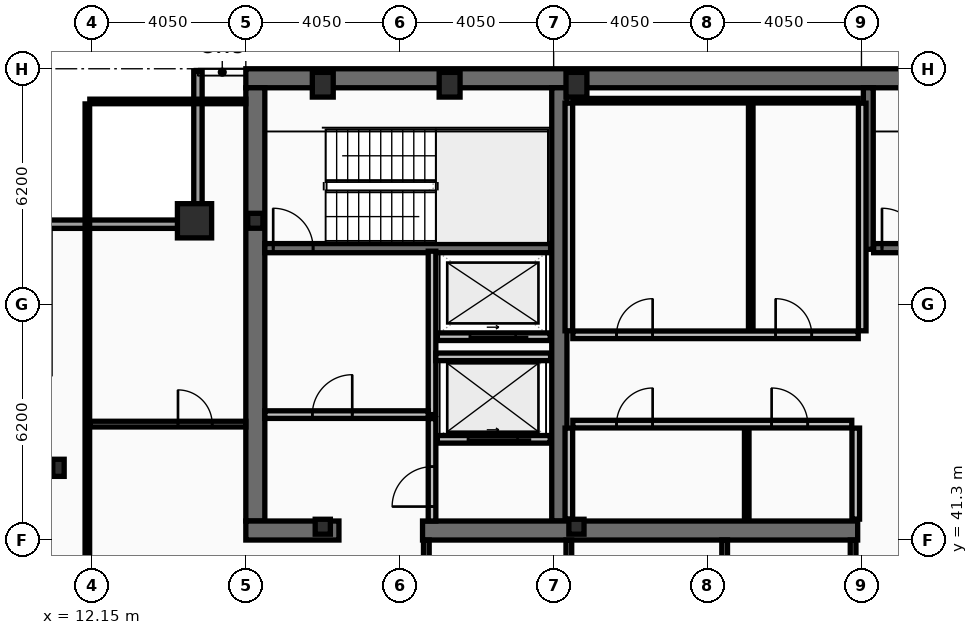
"""IFC4 building model, lengths in metres.
Left out: names, types, materials, properties, quantities, classifications, styles, units other than length and angle.
Written with IfcOpenShell. Run it as: python <this file> out.ifc"""

import sys

from ifc_helpers import new_model, si_unit, direction, frame, frame_2d, origin, origin_2d, place, context, subcontext, project, spatial, rectangle, hollow_rectangle, i_section, extrude, element, fill, save


model = new_model("IFC4")
c1 = context("Model", 3, precision=1e-05, world=origin(), true_north=direction((0.0, 1.0)))
c2 = subcontext(c1, "Body", "Model", "MODEL_VIEW")
j1 = project(units=[si_unit("LENGTHUNIT", "METRE"), si_unit("PLANEANGLEUNIT", "RADIAN")], contexts=[c1])
p1 = place(None, origin())
s1 = spatial("IfcSite", under=j1, at=p1, CompositionType="ELEMENT")
p2 = place(p1, origin())
s2 = spatial("IfcBuilding", under=s1, at=p2, CompositionType="ELEMENT")
p3 = place(p2, frame((0.0, 0.0, 295.0)))
s3 = spatial("IfcBuildingStorey", under=s2, at=p3, CompositionType="ELEMENT", Elevation=295.0)
p4 = place(p3, frame((16.2, 53.45, 0.0), z_axis=(0.0, 0.0, 1.0), x_axis=(1.0, 0.0, 0.0)))
e1 = element("IfcWall", 1, at=p4, inside=s3, PredefinedType="SHEAR", context=c2, shape_type="SweptSolid", body=[
    extrude(rectangle(XDim=40.5, YDim=0.5, at=frame_2d((20.25, 0.0))), origin(), (0.0, 0.0, 1.0), 3.44),
])
p5 = place(p3, frame((16.45, 41.8, 0.0), z_axis=(0.0, 0.0, 1.0), x_axis=(0.0, 1.0, 0.0)))
e2 = element("IfcWall", 2, at=p5, inside=s3, PredefinedType="SHEAR", context=c2, shape_type="SweptSolid", body=[
    extrude(rectangle(XDim=11.4, YDim=0.5, at=frame_2d((5.7, 0.0))), origin(), (0.0, 0.0, 1.0), 3.44),
])
p6 = place(p3, frame((24.45, 41.8, 0.0), z_axis=(0.0, 0.0, 1.0), x_axis=(0.0, 1.0, 0.0)))
e3 = element("IfcWall", 3, at=p6, inside=s3, PredefinedType="SHEAR", context=c2, shape_type="SweptSolid", body=[
    extrude(rectangle(XDim=11.4, YDim=0.4, at=frame_2d((5.7, 0.0))), origin(), (0.0, 0.0, 1.0), 3.44),
])
p7 = place(p3, frame((18.65, 41.55, 0.0), z_axis=(0.0, 0.0, 1.0), x_axis=(-1.0, 0.0, 0.0)))
e4 = element("IfcWall", 4, at=p7, inside=s3, PredefinedType="SHEAR", context=c2, shape_type="SweptSolid", body=[
    extrude(rectangle(XDim=2.45, YDim=0.5, at=frame_2d((1.225, 0.0))), origin(), (0.0, 0.0, 1.0), 3.44),
])
p8 = place(p3, frame((32.3, 41.55, 0.0), z_axis=(0.0, 0.0, 1.0), x_axis=(-1.0, 0.0, 0.0)))
e5 = element("IfcWall", 5, at=p8, inside=s3, PredefinedType="SHEAR", context=c2, shape_type="SweptSolid", body=[
    extrude(rectangle(XDim=11.45, YDim=0.5, at=frame_2d((5.725, 0.0))), origin(), (0.0, 0.0, 1.0), 3.44),
])
p9 = place(p3, frame((32.58, 48.95, 0.0), z_axis=(0.0, 0.0, 1.0), x_axis=(0.0, 1.0, 0.0)))
e6 = element("IfcWall", 6, at=p9, inside=s3, PredefinedType="SHEAR", context=c2, shape_type="SweptSolid", body=[
    extrude(rectangle(XDim=4.25, YDim=0.26, at=frame_2d((2.125, 0.0))), origin(), (0.0, 0.0, 1.0), 3.44),
])
p10 = place(p3, frame((16.7, 48.98, 0.0), z_axis=(0.0, 0.0, 1.0), x_axis=(1.0, 0.0, 0.0)))
e7 = element("IfcWall", 7, at=p10, inside=s3, PredefinedType="SHEAR", context=c2, shape_type="SweptSolid", body=[
    extrude(rectangle(XDim=7.52, YDim=0.24, at=frame_2d((3.76, 0.0))), origin(), (0.0, 0.0, 1.0), 3.44),
])
p11 = place(p10, frame((0.22, 0.0, 0.0)))
e8 = element("IfcOpeningElement", 8, at=p11, cuts=e7, PredefinedType="OPENING", context=c2, shape_type="SweptSolid", body=[
    extrude(rectangle(XDim=1.05, YDim=2.15, at=frame_2d((0.525, 1.075))), frame((0.0, 0.13, 0.0), z_axis=(0.0, -1.0, 0.0), x_axis=(1.0, 0.0, 0.0)), (0.0, 0.0, 1.0), 0.26),
])
p12 = place(p3, frame((32.72, 48.98, 0.0), z_axis=(0.0, 0.0, 1.0), x_axis=(1.0, 0.0, 0.0)))
e9 = element("IfcWall", 9, at=p12, inside=s3, PredefinedType="SHEAR", context=c2, shape_type="SweptSolid", body=[
    extrude(rectangle(XDim=7.56, YDim=0.24, at=frame_2d((3.78, 0.0))), origin(), (0.0, 0.0, 1.0), 3.44),
])
p13 = place(p12, frame((0.22, 0.0, 0.0)))
e10 = element("IfcOpeningElement", 10, at=p13, cuts=e9, PredefinedType="OPENING", context=c2, shape_type="SweptSolid", body=[
    extrude(rectangle(XDim=1.05, YDim=2.15, at=frame_2d((0.525, 1.075))), frame((0.0, 0.13, 0.0), z_axis=(0.0, -1.0, 0.0), x_axis=(1.0, 0.0, 0.0)), (0.0, 0.0, 1.0), 0.26),
])
p14 = place(p3, frame((14.85, 49.7, 0.0), z_axis=(0.0, 0.0, 1.0), x_axis=(1.0, 0.0, 0.0)))
e11 = element("IfcColumn", 11, at=p14, inside=s3, PredefinedType="COLUMN", context=c2, shape_type="SweptSolid", body=[
    extrude(hollow_rectangle(XDim=0.9, YDim=0.9, WallThickness=0.05, at=origin_2d()), origin(), (0.0, 0.0, 1.0), 3.6),
])
for number, where, z_axis, x_axis in (
    (12, (18.225, 53.28, 0.0), (0.0, 0.0, 1.0), (1.0, 0.0, 0.0)),
    (13, (21.562, 53.28, 0.0), (0.0, 0.0, 1.0), (1.0, 0.0, 0.0)),
    (14, (24.9, 53.28, 0.0), (0.0, 0.0, 1.0), (1.0, 0.0, 0.0)),
):
    element("IfcColumn", number, at=place(p3, frame(where, z_axis=z_axis, x_axis=x_axis)), inside=s3, PredefinedType="COLUMN", context=c2, shape_type="SweptSolid", body=[
        extrude(hollow_rectangle(XDim=0.55, YDim=0.65, WallThickness=0.04, at=origin_2d()), origin(), (0.0, 0.0, 1.0), 3.6),
    ])
p15 = place(p3, frame((11.27, 43.2, 0.0), z_axis=(0.0, 0.0, 1.0), x_axis=(1.0, 0.0, 0.0)))
e15 = element("IfcColumn", 15, at=p15, inside=s3, PredefinedType="COLUMN", context=c2, shape_type="SweptSolid", body=[
    extrude(i_section(OverallWidth=0.3, OverallDepth=0.45, WebThickness=0.014, FlangeThickness=0.026, at=origin_2d()), origin(), (0.0, 0.0, 1.0), 3.6),
])
for number, where, z_axis, x_axis in (
    (16, (16.45, 49.7, 0.0), (0.0, 0.0, 1.0), (1.0, 0.0, 0.0)),
    (17, (18.225, 41.65, 0.0), (0.0, 0.0, 1.0), (1.0, 0.0, 0.0)),
    (18, (24.9, 41.65, 0.0), (0.0, 0.0, 1.0), (1.0, 0.0, 0.0)),
):
    element("IfcColumn", number, at=place(p3, frame(where, z_axis=z_axis, x_axis=x_axis)), inside=s3, PredefinedType="COLUMN", context=c2, shape_type="SweptSolid", body=[
        extrude(i_section(OverallWidth=0.399, OverallDepth=0.393, WebThickness=0.023, FlangeThickness=0.037, at=origin_2d()), origin(), (0.0, 0.0, 1.0), 3.6),
    ])
p16 = place(p3, frame((10.83, 49.61, 0.0), z_axis=(0.0, 0.0, 1.0), x_axis=(1.0, 0.0, 0.0)))
e19 = element("IfcWall", 19, at=p16, inside=s3, PredefinedType="SOLIDWALL", context=c2, shape_type="SweptSolid", body=[
    extrude(rectangle(XDim=4.22, YDim=0.22, at=frame_2d((2.11, 0.0))), origin(), (0.0, 0.0, 1.0), 2.88),
])
p17 = place(p3, frame((14.94, 49.72, 0.0), z_axis=(0.0, 0.0, 1.0), x_axis=(0.0, 1.0, 0.0)))
e20 = element("IfcWall", 20, at=p17, inside=s3, PredefinedType="SOLIDWALL", context=c2, shape_type="SweptSolid", body=[
    extrude(rectangle(XDim=3.91, YDim=0.22, at=frame_2d((1.955, 0.0))), origin(), (0.0, 0.0, 1.0), 2.88),
])
p18 = place(p3, frame((24.21, 43.95, 0.0), z_axis=(0.0, 0.0, 1.0), x_axis=(-1.0, 0.0, 0.0)))
e21 = element("IfcWall", 21, at=p18, inside=s3, PredefinedType="PARTITIONING", context=c2, shape_type="SweptSolid", body=[
    extrude(rectangle(XDim=2.97, YDim=0.2, at=frame_2d((1.485, 0.0))), origin(), (0.0, 0.0, 1.0), 3.44),
])
p19 = place(p18, frame((0.86, 0.0, 0.0)))
e22 = element("IfcOpeningElement", 22, at=p19, cuts=e21, PredefinedType="OPENING", context=c2, shape_type="SweptSolid", body=[
    extrude(rectangle(XDim=1.3, YDim=2.18, at=frame_2d((0.65, 1.09))), frame((0.0, 0.11, 0.0), z_axis=(0.0, -1.0, 0.0), x_axis=(1.0, 0.0, 0.0)), (0.0, 0.0, 1.0), 0.22),
])
p20 = place(p3, frame((24.21, 46.65, 0.0), z_axis=(0.0, 0.0, 1.0), x_axis=(-1.0, 0.0, 0.0)))
e23 = element("IfcWall", 23, at=p20, inside=s3, PredefinedType="PARTITIONING", context=c2, shape_type="SweptSolid", body=[
    extrude(rectangle(XDim=2.97, YDim=0.2, at=frame_2d((1.485, 0.0))), origin(), (0.0, 0.0, 1.0), 3.44),
])
p21 = place(p20, frame((0.91, 0.0, 0.0)))
e24 = element("IfcOpeningElement", 24, at=p21, cuts=e23, PredefinedType="OPENING", context=c2, shape_type="SweptSolid", body=[
    extrude(rectangle(XDim=1.2, YDim=2.18, at=frame_2d((0.6, 1.09))), frame((0.0, 0.11, 0.0), z_axis=(0.0, -1.0, 0.0), x_axis=(1.0, 0.0, 0.0)), (0.0, 0.0, 1.0), 0.22),
])
p22 = place(p3, frame((21.1, 44.6, 0.0), z_axis=(0.0, 0.0, 1.0), x_axis=(0.0, 1.0, 0.0)))
e25 = element("IfcWall", 25, at=p22, inside=s3, PredefinedType="PARTITIONING", context=c2, shape_type="SweptSolid", body=[
    extrude(rectangle(XDim=4.3, YDim=0.2, at=frame_2d((2.15, 0.0))), origin(), (0.0, 0.0, 1.0), 3.44),
])
p23 = place(p3, frame((16.7, 44.6, 0.0), z_axis=(0.0, 0.0, 1.0), x_axis=(1.0, 0.0, 0.0)))
e26 = element("IfcWall", 26, at=p23, inside=s3, PredefinedType="PARTITIONING", context=c2, shape_type="SweptSolid", body=[
    extrude(rectangle(XDim=4.3, YDim=0.2, at=frame_2d((2.15, 0.0))), origin(), (0.0, 0.0, 1.0), 3.44),
])
p24 = place(p23, frame((1.25, 0.0, 0.0)))
e27 = element("IfcOpeningElement", 27, at=p24, cuts=e26, PredefinedType="OPENING", context=c2, shape_type="SweptSolid", body=[
    extrude(rectangle(XDim=1.05, YDim=2.15, at=frame_2d((0.525, 1.075))), frame((0.0, 0.11, 0.0), z_axis=(0.0, -1.0, 0.0), x_axis=(1.0, 0.0, 0.0)), (0.0, 0.0, 1.0), 0.22),
])
p25 = place(p3, frame((21.2, 46.12, 0.0), z_axis=(0.0, 0.0, 1.0), x_axis=(1.0, 0.0, 0.0)))
e28 = element("IfcWall", 28, at=p25, inside=s3, PredefinedType="PARTITIONING", context=c2, shape_type="SweptSolid", body=[
    extrude(rectangle(XDim=3.02, YDim=0.2, at=frame_2d((1.51, 0.0))), origin(), (0.0, 0.0, 1.0), 3.44),
])
p26 = place(p3, frame((21.1, 41.8, 0.0), z_axis=(0.0, 0.0, 1.0), x_axis=(0.0, 1.0, 0.0)))
e29 = element("IfcWall", 29, at=p26, inside=s3, PredefinedType="PARTITIONING", context=c2, shape_type="SweptSolid", body=[
    extrude(rectangle(XDim=2.695, YDim=0.2, at=frame_2d((1.348, 0.0))), origin(), (0.0, 0.0, 1.0), 3.44),
])
p27 = place(p26, frame((0.38, 0.0, 0.0)))
e30 = element("IfcOpeningElement", 30, at=p27, cuts=e29, PredefinedType="OPENING", context=c2, shape_type="SweptSolid", body=[
    extrude(rectangle(XDim=1.05, YDim=2.15, at=frame_2d((0.525, 1.075))), frame((0.0, 0.11, 0.0), z_axis=(0.0, -1.0, 0.0), x_axis=(1.0, 0.0, 0.0)), (0.0, 0.0, 1.0), 0.22),
])
for number, where, z_axis, x_axis in (
    (31, (24.7, 46.805, 0.0), (0.0, 0.0, 1.0), (0.0, 1.0, 0.0)),
    (32, (32.42, 46.805, 0.0), (0.0, 0.0, 1.0), (0.0, 1.0, 0.0)),
):
    element("IfcWall", number, at=place(p3, frame(where, z_axis=z_axis, x_axis=x_axis)), inside=s3, PredefinedType="PARTITIONING", context=c2, shape_type="SweptSolid", body=[
        extrude(rectangle(XDim=5.99, YDim=0.2, at=frame_2d((2.995, 0.0))), origin(), (0.0, 0.0, 1.0), 3.44),
    ])
p28 = place(p3, frame((24.805, 52.86, 0.0), z_axis=(0.0, 0.0, 1.0), x_axis=(1.0, 0.0, 0.0)))
e33 = element("IfcWall", 33, at=p28, inside=s3, PredefinedType="PARTITIONING", context=c2, shape_type="SweptSolid", body=[
    extrude(rectangle(XDim=7.51, YDim=0.12, at=frame_2d((3.755, 0.0))), origin(), (0.0, 0.0, 1.0), 3.44),
])
p29 = place(p3, frame((29.486, 46.805, 0.0), z_axis=(0.0, 0.0, 1.0), x_axis=(0.0, 1.0, 0.0)))
e34 = element("IfcWall", 34, at=p29, inside=s3, PredefinedType="PARTITIONING", context=c2, shape_type="SweptSolid", body=[
    extrude(rectangle(XDim=5.99, YDim=0.12, at=frame_2d((2.995, 0.0))), origin(), (0.0, 0.0, 1.0), 3.44),
])
p30 = place(p3, frame((24.805, 46.7, 0.0), z_axis=(0.0, 0.0, 1.0), x_axis=(1.0, 0.0, 0.0)))
e35 = element("IfcWall", 35, at=p30, inside=s3, PredefinedType="PARTITIONING", context=c2, shape_type="SweptSolid", body=[
    extrude(rectangle(XDim=7.51, YDim=0.2, at=frame_2d((3.755, 0.0))), origin(), (0.0, 0.0, 1.0), 3.44),
])
p31 = place(p30, frame((1.15, 0.0, 0.0)))
e36 = element("IfcOpeningElement", 36, at=p31, cuts=e35, PredefinedType="OPENING", context=c2, shape_type="SweptSolid", body=[
    extrude(rectangle(XDim=0.95, YDim=2.1, at=frame_2d((0.475, 1.05))), frame((0.0, 0.11, 0.0), z_axis=(0.0, -1.0, 0.0), x_axis=(1.0, 0.0, 0.0)), (0.0, 0.0, 1.0), 0.22),
])
p32 = place(p30, frame((5.336, 0.0, 0.0)))
e37 = element("IfcOpeningElement", 37, at=p32, cuts=e35, PredefinedType="OPENING", context=c2, shape_type="SweptSolid", body=[
    extrude(rectangle(XDim=0.95, YDim=2.1, at=frame_2d((0.475, 1.05))), frame((0.0, 0.11, 0.0), z_axis=(0.0, -1.0, 0.0), x_axis=(1.0, 0.0, 0.0)), (0.0, 0.0, 1.0), 0.22),
])
for number, where, z_axis, x_axis in (
    (38, (24.7, 41.85, 0.0), (0.0, 0.0, 1.0), (0.0, 1.0, 0.0)),
    (39, (32.25, 41.85, 0.0), (0.0, 0.0, 1.0), (0.0, 1.0, 0.0)),
):
    element("IfcWall", number, at=place(p3, frame(where, z_axis=z_axis, x_axis=x_axis)), inside=s3, PredefinedType="PARTITIONING", context=c2, shape_type="SweptSolid", body=[
        extrude(rectangle(XDim=2.395, YDim=0.2, at=frame_2d((1.198, 0.0))), origin(), (0.0, 0.0, 1.0), 3.44),
    ])
p33 = place(p3, frame((29.381, 41.85, 0.0), z_axis=(0.0, 0.0, 1.0), x_axis=(0.0, 1.0, 0.0)))
e40 = element("IfcWall", 40, at=p33, inside=s3, PredefinedType="PARTITIONING", context=c2, shape_type="SweptSolid", body=[
    extrude(rectangle(XDim=2.395, YDim=0.12, at=frame_2d((1.198, 0.0))), origin(), (0.0, 0.0, 1.0), 3.44),
])
p34 = place(p3, frame((24.805, 44.35, 0.0), z_axis=(0.0, 0.0, 1.0), x_axis=(1.0, 0.0, 0.0)))
e41 = element("IfcWall", 41, at=p34, inside=s3, PredefinedType="PARTITIONING", context=c2, shape_type="SweptSolid", body=[
    extrude(rectangle(XDim=7.34, YDim=0.2, at=frame_2d((3.67, 0.0))), origin(), (0.0, 0.0, 1.0), 3.44),
])
p35 = place(p34, frame((1.15, 0.0, 0.0)))
e42 = element("IfcOpeningElement", 42, at=p35, cuts=e41, PredefinedType="OPENING", context=c2, shape_type="SweptSolid", body=[
    extrude(rectangle(XDim=0.95, YDim=2.1, at=frame_2d((0.475, 1.05))), frame((0.0, 0.11, 0.0), z_axis=(0.0, -1.0, 0.0), x_axis=(1.0, 0.0, 0.0)), (0.0, 0.0, 1.0), 0.22),
])
p36 = place(p34, frame((5.231, 0.0, 0.0)))
e43 = element("IfcOpeningElement", 43, at=p36, cuts=e41, PredefinedType="OPENING", context=c2, shape_type="SweptSolid", body=[
    extrude(rectangle(XDim=0.95, YDim=2.1, at=frame_2d((0.475, 1.05))), frame((0.0, 0.11, 0.0), z_axis=(0.0, -1.0, 0.0), x_axis=(1.0, 0.0, 0.0)), (0.0, 0.0, 1.0), 0.22),
])
p37 = place(p3, frame((20.95, 38.28, 0.0), z_axis=(0.0, 0.0, 1.0), x_axis=(0.0, 1.0, 0.0)))
e44 = element("IfcWall", 44, at=p37, inside=s3, PredefinedType="PARTITIONING", context=c2, shape_type="SweptSolid", body=[
    extrude(rectangle(XDim=3.02, YDim=0.15, at=frame_2d((1.51, 0.0))), origin(), (0.0, 0.0, 1.0), 3.44),
])
p38 = place(p3, frame((24.7, 38.28, 0.0), z_axis=(0.0, 0.0, 1.0), x_axis=(0.0, 1.0, 0.0)))
e45 = element("IfcWall", 45, at=p38, inside=s3, PredefinedType="PARTITIONING", context=c2, shape_type="SweptSolid", body=[
    extrude(rectangle(XDim=3.02, YDim=0.15, at=frame_2d((1.51, 0.0))), origin(), (0.0, 0.0, 1.0), 2.78),
])
for number, where, z_axis, x_axis in (
    (46, (28.8, 38.28, 0.0), (0.0, 0.0, 1.0), (0.0, 1.0, 0.0)),
    (47, (32.18, 38.28, 0.0), (0.0, 0.0, 1.0), (0.0, 1.0, 0.0)),
):
    element("IfcWall", number, at=place(p3, frame(where, z_axis=z_axis, x_axis=x_axis)), inside=s3, PredefinedType="PARTITIONING", context=c2, shape_type="SweptSolid", body=[
        extrude(rectangle(XDim=3.02, YDim=0.15, at=frame_2d((1.51, 0.0))), origin(), (0.0, 0.0, 1.0), 3.44),
    ])
p39 = place(p3, frame((12.095, 44.35, 0.0), z_axis=(0.0, 0.0, 1.0), x_axis=(1.0, 0.0, 0.0)))
e48 = element("IfcWall", 48, at=p39, inside=s3, PredefinedType="PARTITIONING", context=c2, shape_type="SweptSolid", body=[
    extrude(rectangle(XDim=4.105, YDim=0.15, at=frame_2d((2.052, 0.0))), origin(), (0.0, 0.0, 1.0), 2.88),
])
p40 = place(p39, frame((2.32, 0.0, 0.0)))
e49 = element("IfcOpeningElement", 49, at=p40, cuts=e48, PredefinedType="OPENING", context=c2, shape_type="SweptSolid", body=[
    extrude(rectangle(XDim=0.9, YDim=2.05, at=frame_2d((0.45, 1.025))), frame((0.0, 0.085, 0.0), z_axis=(0.0, -1.0, 0.0), x_axis=(1.0, 0.0, 0.0)), (0.0, 0.0, 1.0), 0.17),
])
p41 = place(p3, frame((12.03, 10.665, 0.0), z_axis=(0.0, 0.0, 1.0), x_axis=(0.0, 1.0, 0.0)))
e50 = element("IfcWall", 50, at=p41, inside=s3, PredefinedType="PARTITIONING", context=c2, shape_type="SweptSolid", body=[
    extrude(rectangle(XDim=42.11, YDim=0.12, at=frame_2d((21.055, 0.0))), origin(), (0.0, 0.0, 1.0), 2.78),
])
p42 = place(p3, frame((12.095, 52.84, 0.0), z_axis=(0.0, 0.0, 1.0), x_axis=(1.0, 0.0, 0.0)))
e51 = element("IfcWall", 51, at=p42, inside=s3, PredefinedType="PARTITIONING", context=c2, shape_type="SweptSolid", body=[
    extrude(rectangle(XDim=4.105, YDim=0.12, at=frame_2d((2.052, 0.0))), origin(), (0.0, 0.0, 1.0), 3.44),
])
p43 = place(p11, origin())
e52 = element("IfcDoor", 52, at=p43, inside=s3, OperationType="SINGLE_SWING_LEFT", PredefinedType="DOOR", context=c2, shape_type="SweptSolid", body=[
    extrude(rectangle(XDim=1.05, YDim=2.15, at=frame_2d((0.525, 1.075))), frame((0.0, 0.025, 0.0), z_axis=(0.0, -1.0, 0.0), x_axis=(1.0, 0.0, 0.0)), (0.0, 0.0, 1.0), 0.05),
])
fill(e8, e52)
p44 = place(p13, origin())
e53 = element("IfcDoor", 53, at=p44, inside=s3, OperationType="SINGLE_SWING_LEFT", PredefinedType="DOOR", context=c2, shape_type="SweptSolid", body=[
    extrude(rectangle(XDim=1.05, YDim=2.15, at=frame_2d((0.525, 1.075))), frame((0.0, 0.025, 0.0), z_axis=(0.0, -1.0, 0.0), x_axis=(1.0, 0.0, 0.0)), (0.0, 0.0, 1.0), 0.05),
])
fill(e10, e53)
p45 = place(p19, origin())
e54 = element("IfcDoor", 54, at=p45, inside=s3, OperationType="SLIDING_TO_LEFT", PredefinedType="DOOR", context=c2, shape_type="SweptSolid", body=[
    extrude(rectangle(XDim=1.3, YDim=2.18, at=frame_2d((0.65, 1.09))), frame((0.0, 0.025, 0.0), z_axis=(0.0, -1.0, 0.0), x_axis=(1.0, 0.0, 0.0)), (0.0, 0.0, 1.0), 0.05),
])
fill(e22, e54)
p46 = place(p21, origin())
e55 = element("IfcDoor", 55, at=p46, inside=s3, OperationType="SLIDING_TO_LEFT", PredefinedType="DOOR", context=c2, shape_type="SweptSolid", body=[
    extrude(rectangle(XDim=1.2, YDim=2.18, at=frame_2d((0.6, 1.09))), frame((0.0, 0.025, 0.0), z_axis=(0.0, -1.0, 0.0), x_axis=(1.0, 0.0, 0.0)), (0.0, 0.0, 1.0), 0.05),
])
fill(e24, e55)
p47 = place(p24, origin())
e56 = element("IfcDoor", 56, at=p47, inside=s3, OperationType="SINGLE_SWING_RIGHT", PredefinedType="DOOR", context=c2, shape_type="SweptSolid", body=[
    extrude(rectangle(XDim=1.05, YDim=2.15, at=frame_2d((0.525, 1.075))), frame((0.0, 0.025, 0.0), z_axis=(0.0, -1.0, 0.0), x_axis=(1.0, 0.0, 0.0)), (0.0, 0.0, 1.0), 0.05),
])
fill(e27, e56)
p48 = place(p27, origin())
e57 = element("IfcDoor", 57, at=p48, inside=s3, OperationType="SINGLE_SWING_LEFT", PredefinedType="DOOR", context=c2, shape_type="SweptSolid", body=[
    extrude(rectangle(XDim=1.05, YDim=2.15, at=frame_2d((0.525, 1.075))), frame((0.0, 0.025, 0.0), z_axis=(0.0, -1.0, 0.0), x_axis=(1.0, 0.0, 0.0)), (0.0, 0.0, 1.0), 0.05),
])
fill(e30, e57)
p49 = place(p31, origin())
e58 = element("IfcDoor", 58, at=p49, inside=s3, OperationType="SINGLE_SWING_RIGHT", PredefinedType="DOOR", context=c2, shape_type="SweptSolid", body=[
    extrude(rectangle(XDim=0.95, YDim=2.1, at=frame_2d((0.475, 1.05))), frame((0.0, 0.025, 0.0), z_axis=(0.0, -1.0, 0.0), x_axis=(1.0, 0.0, 0.0)), (0.0, 0.0, 1.0), 0.05),
])
fill(e36, e58)
p50 = place(p32, origin())
e59 = element("IfcDoor", 59, at=p50, inside=s3, OperationType="SINGLE_SWING_LEFT", PredefinedType="DOOR", context=c2, shape_type="SweptSolid", body=[
    extrude(rectangle(XDim=0.95, YDim=2.1, at=frame_2d((0.475, 1.05))), frame((0.0, 0.025, 0.0), z_axis=(0.0, -1.0, 0.0), x_axis=(1.0, 0.0, 0.0)), (0.0, 0.0, 1.0), 0.05),
])
fill(e37, e59)
p51 = place(p35, origin())
e60 = element("IfcDoor", 60, at=p51, inside=s3, OperationType="SINGLE_SWING_RIGHT", PredefinedType="DOOR", context=c2, shape_type="SweptSolid", body=[
    extrude(rectangle(XDim=0.95, YDim=2.1, at=frame_2d((0.475, 1.05))), frame((0.0, 0.025, 0.0), z_axis=(0.0, -1.0, 0.0), x_axis=(1.0, 0.0, 0.0)), (0.0, 0.0, 1.0), 0.05),
])
fill(e42, e60)
p52 = place(p36, origin())
e61 = element("IfcDoor", 61, at=p52, inside=s3, OperationType="SINGLE_SWING_LEFT", PredefinedType="DOOR", context=c2, shape_type="SweptSolid", body=[
    extrude(rectangle(XDim=0.95, YDim=2.1, at=frame_2d((0.475, 1.05))), frame((0.0, 0.025, 0.0), z_axis=(0.0, -1.0, 0.0), x_axis=(1.0, 0.0, 0.0)), (0.0, 0.0, 1.0), 0.05),
])
fill(e43, e61)
p53 = place(p40, origin())
e62 = element("IfcDoor", 62, at=p53, inside=s3, OperationType="SINGLE_SWING_LEFT", PredefinedType="DOOR", context=c2, shape_type="SweptSolid", body=[
    extrude(rectangle(XDim=0.9, YDim=2.05, at=frame_2d((0.45, 1.025))), frame((0.0, 0.025, 0.0), z_axis=(0.0, -1.0, 0.0), x_axis=(1.0, 0.0, 0.0)), (0.0, 0.0, 1.0), 0.05),
])
fill(e49, e62)
save(model, sys.argv[1])
